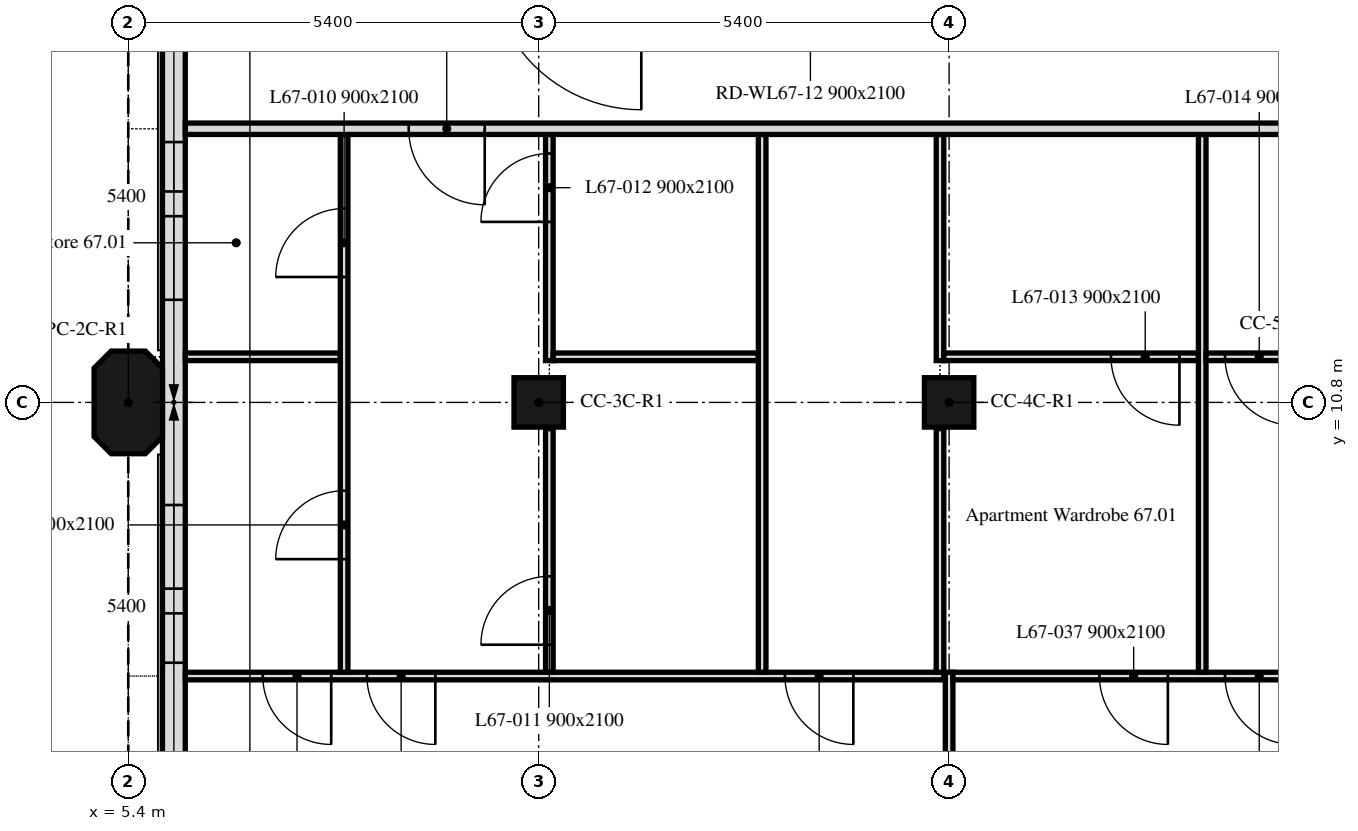
"""IFC4 building model, lengths in metres.
Left out: names, types, materials, properties, quantities, classifications, styles, units other than length and angle.
Written with IfcOpenShell. Run it as: python <this file> out.ifc"""

import sys

from ifc_helpers import new_model, si_unit, direction, frame, frame_2d, origin, origin_2d, place, context, subcontext, project, spatial, polyline, rectangle, outline, extrude, element, fill, save


model = new_model("IFC4")
c1 = context("Model", 3, precision=1e-05, world=origin(), true_north=direction((0.0, 1.0)))
c2 = subcontext(c1, "Body", "Model", "MODEL_VIEW")
j1 = project(units=[si_unit("LENGTHUNIT", "METRE"), si_unit("PLANEANGLEUNIT", "RADIAN")], contexts=[c1])
p1 = place(None, origin())
s1 = spatial("IfcSite", under=j1, at=p1, CompositionType="ELEMENT")
p2 = place(p1, origin())
s2 = spatial("IfcBuilding", under=s1, at=p2, CompositionType="ELEMENT")
p3 = place(p2, frame((0.0, 0.0, 275.2)))
s3 = spatial("IfcBuildingStorey", under=s2, at=p3, CompositionType="ELEMENT", Elevation=275.2)
p4 = place(p3, frame((5.4, 10.8, 0.0), z_axis=(0.0, 0.0, 1.0), x_axis=(0.0, 1.0, 0.0)))
e1 = element("IfcColumn", 1, at=p4, inside=s3, PredefinedType="COLUMN", context=c2, shape_type="SweptSolid", body=[
    extrude(outline(polyline([(-0.45, -0.45), (0.45, -0.45), (0.675, -0.225), (0.675, 0.225), (0.45, 0.45), (-0.45, 0.45), (-0.675, 0.225), (-0.675, -0.225), (-0.45, -0.45)])), origin(), (0.0, 0.0, 1.0), 3.0),
])
for number, where, z_axis, x_axis in (
    (2, (10.8, 10.8, 0.0), (0.0, 0.0, 1.0), (1.0, 0.0, 0.0)),
    (3, (16.2, 10.8, 0.0), (0.0, 0.0, 1.0), (1.0, 0.0, 0.0)),
):
    element("IfcColumn", number, at=place(p3, frame(where, z_axis=z_axis, x_axis=x_axis)), inside=s3, PredefinedType="COLUMN", context=c2, shape_type="SweptSolid", body=[
        extrude(rectangle(XDim=0.65, YDim=0.65, at=origin_2d()), origin(), (0.0, 0.0, 1.0), 3.0),
    ])
p5 = place(p3, frame((6.0, 16.2, 0.0), z_axis=(0.0, 0.0, 1.0), x_axis=(0.0, -1.0, 0.0)))
e4 = element("IfcWall", 4, at=p5, inside=s3, PredefinedType="SOLIDWALL", context=c2, shape_type="SweptSolid", body=[
    extrude(rectangle(XDim=10.614, YDim=0.3, at=frame_2d((5.307, 0.0))), origin(), (0.0, 0.0, 1.0), 3.0),
])
p6 = place(p5, frame((1.975, 0.0, 0.9)))
e5 = element("IfcOpeningElement", 5, at=p6, cuts=e4, PredefinedType="OPENING", context=c2, shape_type="SweptSolid", body=[
    extrude(rectangle(XDim=0.65, YDim=1.7, at=frame_2d((0.325, 0.85))), frame((0.0, 0.16, 0.0), z_axis=(0.0, -1.0, 0.0), x_axis=(1.0, 0.0, 0.0)), (0.0, 0.0, 1.0), 0.32),
])
p7 = place(p5, frame((2.95, 0.0, 0.9)))
e6 = element("IfcOpeningElement", 6, at=p7, cuts=e4, PredefinedType="OPENING", context=c2, shape_type="SweptSolid", body=[
    extrude(rectangle(XDim=1.1, YDim=1.7, at=frame_2d((0.55, 0.85))), frame((0.0, 0.16, 0.0), z_axis=(0.0, -1.0, 0.0), x_axis=(1.0, 0.0, 0.0)), (0.0, 0.0, 1.0), 0.32),
])
p8 = place(p5, frame((6.75, 0.0, 0.9)))
e7 = element("IfcOpeningElement", 7, at=p8, cuts=e4, PredefinedType="OPENING", context=c2, shape_type="SweptSolid", body=[
    extrude(rectangle(XDim=1.1, YDim=1.7, at=frame_2d((0.55, 0.85))), frame((0.0, 0.16, 0.0), z_axis=(0.0, -1.0, 0.0), x_axis=(1.0, 0.0, 0.0)), (0.0, 0.0, 1.0), 0.32),
])
p9 = place(p5, frame((8.175, 0.0, 0.9)))
e8 = element("IfcOpeningElement", 8, at=p9, cuts=e4, PredefinedType="OPENING", context=c2, shape_type="SweptSolid", body=[
    extrude(rectangle(XDim=0.65, YDim=1.7, at=frame_2d((0.325, 0.85))), frame((0.0, 0.16, 0.0), z_axis=(0.0, -1.0, 0.0), x_axis=(1.0, 0.0, 0.0)), (0.0, 0.0, 1.0), 0.32),
])
p10 = place(p3, frame((16.2, 5.745, 0.0), z_axis=(0.0, 0.0, 1.0), x_axis=(0.0, 1.0, 0.0)))
e9 = element("IfcWall", 9, at=p10, inside=s3, PredefinedType="PARTITIONING", context=c2, shape_type="SweptSolid", body=[
    extrude(rectangle(XDim=1.505, YDim=0.1, at=frame_2d((0.752, 0.0))), origin(), (0.0, 0.0, 1.0), 2.4),
])
p11 = place(p3, frame((16.13, 7.2, 0.0), z_axis=(0.0, 0.0, 1.0), x_axis=(-1.0, 0.0, 0.0)))
e10 = element("IfcWall", 10, at=p11, inside=s3, PredefinedType="PARTITIONING", context=c2, shape_type="SweptSolid", body=[
    extrude(rectangle(XDim=9.979, YDim=0.1, at=frame_2d((4.99, 0.0))), origin(), (0.0, 0.0, 1.0), 3.0),
])
p12 = place(p11, frame((1.19, 0.0, 0.0)))
e11 = element("IfcOpeningElement", 11, at=p12, cuts=e10, PredefinedType="OPENING", context=c2, shape_type="SweptSolid", body=[
    extrude(rectangle(XDim=0.9, YDim=2.1, at=frame_2d((0.45, 1.05))), frame((0.0, 0.05, 0.0), z_axis=(0.0, -1.0, 0.0), x_axis=(1.0, 0.0, 0.0)), (0.0, 0.0, 1.0), 0.1),
])
p13 = place(p11, frame((8.06, 0.0, 0.0)))
e12 = element("IfcOpeningElement", 12, at=p13, cuts=e10, PredefinedType="OPENING", context=c2, shape_type="SweptSolid", body=[
    extrude(rectangle(XDim=0.9, YDim=2.1, at=frame_2d((0.45, 1.05))), frame((0.0, 0.05, 0.0), z_axis=(0.0, -1.0, 0.0), x_axis=(1.0, 0.0, 0.0)), (0.0, 0.0, 1.0), 0.1),
])
p14 = place(p11, frame((6.69, 0.0, 0.0)))
e13 = element("IfcOpeningElement", 13, at=p14, cuts=e10, PredefinedType="OPENING", context=c2, shape_type="SweptSolid", body=[
    extrude(rectangle(XDim=0.9, YDim=2.1, at=frame_2d((0.45, 1.05))), frame((0.0, 0.05, 0.0), z_axis=(0.0, -1.0, 0.0), x_axis=(1.0, 0.0, 0.0)), (0.0, 0.0, 1.0), 0.1),
])
p15 = place(p3, frame((21.525, 7.2, 0.0), z_axis=(0.0, 0.0, 1.0), x_axis=(-1.0, 0.0, 0.0)))
e14 = element("IfcWall", 14, at=p15, inside=s3, PredefinedType="PARTITIONING", context=c2, shape_type="SweptSolid", body=[
    extrude(rectangle(XDim=5.275, YDim=0.1, at=frame_2d((2.637, 0.0))), origin(), (0.0, 0.0, 1.0), 3.0),
])
p16 = place(p15, frame((2.447, 0.0, 0.0)))
e15 = element("IfcOpeningElement", 15, at=p16, cuts=e14, PredefinedType="OPENING", context=c2, shape_type="SweptSolid", body=[
    extrude(rectangle(XDim=0.9, YDim=2.1, at=frame_2d((0.45, 1.05))), frame((0.0, 0.05, 0.0), z_axis=(0.0, -1.0, 0.0), x_axis=(1.0, 0.0, 0.0)), (0.0, 0.0, 1.0), 0.1),
])
p17 = place(p15, frame((0.795, 0.0, 0.0)))
e16 = element("IfcOpeningElement", 16, at=p17, cuts=e14, PredefinedType="OPENING", context=c2, shape_type="SweptSolid", body=[
    extrude(rectangle(XDim=0.9, YDim=2.1, at=frame_2d((0.45, 1.05))), frame((0.0, 0.05, 0.0), z_axis=(0.0, -1.0, 0.0), x_axis=(1.0, 0.0, 0.0)), (0.0, 0.0, 1.0), 0.1),
])
p18 = place(p3, frame((8.19, 11.4, 0.0), z_axis=(0.0, 0.0, 1.0), x_axis=(-1.0, 0.0, 0.0)))
e17 = element("IfcWall", 17, at=p18, inside=s3, PredefinedType="PARTITIONING", context=c2, shape_type="SweptSolid", body=[
    extrude(rectangle(XDim=2.039, YDim=0.1, at=frame_2d((1.02, 0.0))), origin(), (0.0, 0.0, 1.0), 3.0),
])
p19 = place(p3, frame((8.24, 7.25, 0.0), z_axis=(0.0, 0.0, 1.0), x_axis=(0.0, 1.0, 0.0)))
e18 = element("IfcWall", 18, at=p19, inside=s3, PredefinedType="PARTITIONING", context=c2, shape_type="SweptSolid", body=[
    extrude(rectangle(XDim=7.075, YDim=0.1, at=frame_2d((3.538, 0.0))), origin(), (0.0, 0.0, 1.0), 3.0),
])
p20 = place(p19, frame((5.2, 0.0, 0.0)))
e19 = element("IfcOpeningElement", 19, at=p20, cuts=e18, PredefinedType="OPENING", context=c2, shape_type="SweptSolid", body=[
    extrude(rectangle(XDim=0.9, YDim=2.1, at=frame_2d((0.45, 1.05))), frame((0.0, 0.05, 0.0), z_axis=(0.0, -1.0, 0.0), x_axis=(1.0, 0.0, 0.0)), (0.0, 0.0, 1.0), 0.1),
])
p21 = place(p19, frame((1.488, 0.0, 0.0)))
e20 = element("IfcOpeningElement", 20, at=p21, cuts=e18, PredefinedType="OPENING", context=c2, shape_type="SweptSolid", body=[
    extrude(rectangle(XDim=0.9, YDim=2.1, at=frame_2d((0.45, 1.05))), frame((0.0, 0.05, 0.0), z_axis=(0.0, -1.0, 0.0), x_axis=(1.0, 0.0, 0.0)), (0.0, 0.0, 1.0), 0.1),
])
p22 = place(p3, frame((10.94, 7.25, 0.0), z_axis=(0.0, 0.0, 1.0), x_axis=(0.0, 1.0, 0.0)))
e21 = element("IfcWall", 21, at=p22, inside=s3, PredefinedType="PARTITIONING", context=c2, shape_type="SweptSolid", body=[
    extrude(rectangle(XDim=3.205, YDim=0.1, at=frame_2d((1.603, 0.0))), origin(), (0.0, 0.0, 1.0), 3.0),
])
p23 = place(p22, frame((0.362, 0.0, 0.0)))
e22 = element("IfcOpeningElement", 22, at=p23, cuts=e21, PredefinedType="OPENING", context=c2, shape_type="SweptSolid", body=[
    extrude(rectangle(XDim=0.9, YDim=2.1, at=frame_2d((0.45, 1.05))), frame((0.0, 0.05, 0.0), z_axis=(0.0, -1.0, 0.0), x_axis=(1.0, 0.0, 0.0)), (0.0, 0.0, 1.0), 0.1),
])
p24 = place(p3, frame((10.94, 11.35, 0.0), z_axis=(0.0, 0.0, 1.0), x_axis=(0.0, 1.0, 0.0)))
e23 = element("IfcWall", 23, at=p24, inside=s3, PredefinedType="PARTITIONING", context=c2, shape_type="SweptSolid", body=[
    extrude(rectangle(XDim=2.975, YDim=0.1, at=frame_2d((1.487, 0.0))), origin(), (0.0, 0.0, 1.0), 3.0),
])
p25 = place(p24, frame((1.825, 0.0, 0.0)))
e24 = element("IfcOpeningElement", 24, at=p25, cuts=e23, PredefinedType="OPENING", context=c2, shape_type="SweptSolid", body=[
    extrude(rectangle(XDim=0.9, YDim=2.1, at=frame_2d((0.45, 1.05))), frame((0.0, 0.05, 0.0), z_axis=(0.0, -1.0, 0.0), x_axis=(1.0, 0.0, 0.0)), (0.0, 0.0, 1.0), 0.1),
])
p26 = place(p3, frame((13.69, 11.4, 0.0), z_axis=(0.0, 0.0, 1.0), x_axis=(-1.0, 0.0, 0.0)))
e25 = element("IfcWall", 25, at=p26, inside=s3, PredefinedType="PARTITIONING", context=c2, shape_type="SweptSolid", body=[
    extrude(rectangle(XDim=2.7, YDim=0.1, at=frame_2d((1.35, 0.0))), origin(), (0.0, 0.0, 1.0), 3.0),
])
p27 = place(p3, frame((13.74, 7.25, 0.0), z_axis=(0.0, 0.0, 1.0), x_axis=(0.0, 1.0, 0.0)))
e26 = element("IfcWall", 26, at=p27, inside=s3, PredefinedType="PARTITIONING", context=c2, shape_type="SweptSolid", body=[
    extrude(rectangle(XDim=7.075, YDim=0.1, at=frame_2d((3.538, 0.0))), origin(), (0.0, 0.0, 1.0), 3.0),
])
p28 = place(p3, frame((16.08, 7.25, 0.0), z_axis=(0.0, 0.0, 1.0), x_axis=(0.0, 1.0, 0.0)))
e27 = element("IfcWall", 27, at=p28, inside=s3, PredefinedType="PARTITIONING", context=c2, shape_type="SweptSolid", body=[
    extrude(rectangle(XDim=3.205, YDim=0.1, at=frame_2d((1.603, 0.0))), origin(), (0.0, 0.0, 1.0), 2.4),
])
p29 = place(p3, frame((16.08, 11.35, 0.0), z_axis=(0.0, 0.0, 1.0), x_axis=(0.0, 1.0, 0.0)))
e28 = element("IfcWall", 28, at=p29, inside=s3, PredefinedType="PARTITIONING", context=c2, shape_type="SweptSolid", body=[
    extrude(rectangle(XDim=2.975, YDim=0.1, at=frame_2d((1.487, 0.0))), origin(), (0.0, 0.0, 1.0), 2.4),
])
p30 = place(p3, frame((19.48, 11.4, 0.0), z_axis=(0.0, 0.0, 1.0), x_axis=(-1.0, 0.0, 0.0)))
e29 = element("IfcWall", 29, at=p30, inside=s3, PredefinedType="PARTITIONING", context=c2, shape_type="SweptSolid", body=[
    extrude(rectangle(XDim=3.35, YDim=0.1, at=frame_2d((1.675, 0.0))), origin(), (0.0, 0.0, 1.0), 3.0),
])
p31 = place(p30, frame((0.25, 0.0, 0.0)))
e30 = element("IfcOpeningElement", 30, at=p31, cuts=e29, PredefinedType="OPENING", context=c2, shape_type="SweptSolid", body=[
    extrude(rectangle(XDim=0.9, YDim=2.1, at=frame_2d((0.45, 1.05))), frame((0.0, 0.05, 0.0), z_axis=(0.0, -1.0, 0.0), x_axis=(1.0, 0.0, 0.0)), (0.0, 0.0, 1.0), 0.1),
])
p32 = place(p3, frame((19.53, 7.25, 0.0), z_axis=(0.0, 0.0, 1.0), x_axis=(0.0, 1.0, 0.0)))
e31 = element("IfcWall", 31, at=p32, inside=s3, PredefinedType="PARTITIONING", context=c2, shape_type="SweptSolid", body=[
    extrude(rectangle(XDim=7.075, YDim=0.1, at=frame_2d((3.538, 0.0))), origin(), (0.0, 0.0, 1.0), 3.0),
])
p33 = place(p3, frame((23.221, 11.4, 0.0), z_axis=(0.0, 0.0, 1.0), x_axis=(-1.0, 0.0, 0.0)))
e32 = element("IfcWall", 32, at=p33, inside=s3, PredefinedType="PARTITIONING", context=c2, shape_type="SweptSolid", body=[
    extrude(rectangle(XDim=3.641, YDim=0.1, at=frame_2d((1.82, 0.0))), origin(), (0.0, 0.0, 1.0), 2.4),
])
p34 = place(p33, frame((2.491, 0.0, 0.0)))
e33 = element("IfcOpeningElement", 33, at=p34, cuts=e32, PredefinedType="OPENING", context=c2, shape_type="SweptSolid", body=[
    extrude(rectangle(XDim=0.9, YDim=2.1, at=frame_2d((0.45, 1.05))), frame((0.0, 0.05, 0.0), z_axis=(0.0, -1.0, 0.0), x_axis=(1.0, 0.0, 0.0)), (0.0, 0.0, 1.0), 0.1),
])
p35 = place(p3, frame((47.849, 14.4, 0.0), z_axis=(0.0, 0.0, 1.0), x_axis=(-1.0, 0.0, 0.0)))
e34 = element("IfcWall", 34, at=p35, inside=s3, PredefinedType="PARTITIONING", context=c2, shape_type="SweptSolid", body=[
    extrude(rectangle(XDim=41.698, YDim=0.15, at=frame_2d((20.849, 0.0))), origin(), (0.0, 0.0, 1.0), 2.4),
])
p36 = place(p35, frame((10.881, 0.0, 0.0)))
e35 = element("IfcOpeningElement", 35, at=p36, cuts=e34, PredefinedType="OPENING", context=c2, shape_type="SweptSolid", body=[
    extrude(rectangle(XDim=1.0, YDim=2.1, at=frame_2d((0.5, 1.05))), frame((0.0, 0.075, 0.0), z_axis=(0.0, -1.0, 0.0), x_axis=(1.0, 0.0, 0.0)), (0.0, 0.0, 1.0), 0.15),
])
p37 = place(p35, frame((37.759, 0.0, 0.0)))
e36 = element("IfcOpeningElement", 36, at=p37, cuts=e34, PredefinedType="OPENING", context=c2, shape_type="SweptSolid", body=[
    extrude(rectangle(XDim=1.0, YDim=2.1, at=frame_2d((0.5, 1.05))), frame((0.0, 0.075, 0.0), z_axis=(0.0, -1.0, 0.0), x_axis=(1.0, 0.0, 0.0)), (0.0, 0.0, 1.0), 0.15),
])
p38 = place(p35, frame((22.815, 0.0, 0.0)))
e37 = element("IfcOpeningElement", 37, at=p38, cuts=e34, PredefinedType="OPENING", context=c2, shape_type="SweptSolid", body=[
    extrude(rectangle(XDim=1.0, YDim=2.1, at=frame_2d((0.5, 1.05))), frame((0.0, 0.075, 0.0), z_axis=(0.0, -1.0, 0.0), x_axis=(1.0, 0.0, 0.0)), (0.0, 0.0, 1.0), 0.15),
])
p39 = place(p35, frame((4.85, 0.0, 0.0)))
e38 = element("IfcOpeningElement", 38, at=p39, cuts=e34, PredefinedType="OPENING", context=c2, shape_type="SweptSolid", body=[
    extrude(rectangle(XDim=1.0, YDim=2.1, at=frame_2d((0.5, 1.05))), frame((0.0, 0.075, 0.0), z_axis=(0.0, -1.0, 0.0), x_axis=(1.0, 0.0, 0.0)), (0.0, 0.0, 1.0), 0.15),
])
p40 = place(p6, origin())
e39 = element("IfcWindow", 39, at=p40, inside=s3, PartitioningType="SINGLE_PANEL", PredefinedType="WINDOW", context=c2, shape_type="SweptSolid", body=[
    extrude(rectangle(XDim=0.65, YDim=1.7, at=frame_2d((0.325, 0.85))), frame((0.0, 0.03, 0.0), z_axis=(0.0, -1.0, 0.0), x_axis=(1.0, 0.0, 0.0)), (0.0, 0.0, 1.0), 0.06),
])
fill(e5, e39)
p41 = place(p7, origin())
e40 = element("IfcWindow", 40, at=p41, inside=s3, PartitioningType="SINGLE_PANEL", PredefinedType="WINDOW", context=c2, shape_type="SweptSolid", body=[
    extrude(rectangle(XDim=1.1, YDim=1.7, at=frame_2d((0.55, 0.85))), frame((0.0, 0.03, 0.0), z_axis=(0.0, -1.0, 0.0), x_axis=(1.0, 0.0, 0.0)), (0.0, 0.0, 1.0), 0.06),
])
fill(e6, e40)
p42 = place(p8, origin())
e41 = element("IfcWindow", 41, at=p42, inside=s3, PartitioningType="SINGLE_PANEL", PredefinedType="WINDOW", context=c2, shape_type="SweptSolid", body=[
    extrude(rectangle(XDim=1.1, YDim=1.7, at=frame_2d((0.55, 0.85))), frame((0.0, 0.03, 0.0), z_axis=(0.0, -1.0, 0.0), x_axis=(1.0, 0.0, 0.0)), (0.0, 0.0, 1.0), 0.06),
])
fill(e7, e41)
p43 = place(p9, origin())
e42 = element("IfcWindow", 42, at=p43, inside=s3, PartitioningType="SINGLE_PANEL", PredefinedType="WINDOW", context=c2, shape_type="SweptSolid", body=[
    extrude(rectangle(XDim=0.65, YDim=1.7, at=frame_2d((0.325, 0.85))), frame((0.0, 0.03, 0.0), z_axis=(0.0, -1.0, 0.0), x_axis=(1.0, 0.0, 0.0)), (0.0, 0.0, 1.0), 0.06),
])
fill(e8, e42)
p44 = place(p12, origin())
e43 = element("IfcDoor", 43, at=p44, inside=s3, OperationType="SINGLE_SWING_RIGHT", PredefinedType="DOOR", context=c2, shape_type="SweptSolid", body=[
    extrude(rectangle(XDim=0.9, YDim=2.1, at=frame_2d((0.45, 1.05))), frame((0.0, 0.025, 0.0), z_axis=(0.0, -1.0, 0.0), x_axis=(1.0, 0.0, 0.0)), (0.0, 0.0, 1.0), 0.05),
])
fill(e11, e43)
p45 = place(p20, origin())
e44 = element("IfcDoor", 44, at=p45, inside=s3, OperationType="SINGLE_SWING_RIGHT", PredefinedType="DOOR", context=c2, shape_type="SweptSolid", body=[
    extrude(rectangle(XDim=0.9, YDim=2.1, at=frame_2d((0.45, 1.05))), frame((0.0, 0.025, 0.0), z_axis=(0.0, -1.0, 0.0), x_axis=(1.0, 0.0, 0.0)), (0.0, 0.0, 1.0), 0.05),
])
fill(e19, e44)
p46 = place(p23, origin())
e45 = element("IfcDoor", 45, at=p46, inside=s3, OperationType="SINGLE_SWING_LEFT", PredefinedType="DOOR", context=c2, shape_type="SweptSolid", body=[
    extrude(rectangle(XDim=0.9, YDim=2.1, at=frame_2d((0.45, 1.05))), frame((0.0, 0.025, 0.0), z_axis=(0.0, -1.0, 0.0), x_axis=(1.0, 0.0, 0.0)), (0.0, 0.0, 1.0), 0.05),
])
fill(e22, e45)
p47 = place(p25, origin())
e46 = element("IfcDoor", 46, at=p47, inside=s3, OperationType="SINGLE_SWING_LEFT", PredefinedType="DOOR", context=c2, shape_type="SweptSolid", body=[
    extrude(rectangle(XDim=0.9, YDim=2.1, at=frame_2d((0.45, 1.05))), frame((0.0, 0.025, 0.0), z_axis=(0.0, -1.0, 0.0), x_axis=(1.0, 0.0, 0.0)), (0.0, 0.0, 1.0), 0.05),
])
fill(e24, e46)
p48 = place(p31, origin())
e47 = element("IfcDoor", 47, at=p48, inside=s3, OperationType="SINGLE_SWING_RIGHT", PredefinedType="DOOR", context=c2, shape_type="SweptSolid", body=[
    extrude(rectangle(XDim=0.9, YDim=2.1, at=frame_2d((0.45, 1.05))), frame((0.0, 0.025, 0.0), z_axis=(0.0, -1.0, 0.0), x_axis=(1.0, 0.0, 0.0)), (0.0, 0.0, 1.0), 0.05),
])
fill(e30, e47)
p49 = place(p34, origin())
e48 = element("IfcDoor", 48, at=p49, inside=s3, OperationType="SINGLE_SWING_RIGHT", PredefinedType="DOOR", context=c2, shape_type="SweptSolid", body=[
    extrude(rectangle(XDim=0.9, YDim=2.1, at=frame_2d((0.45, 1.05))), frame((0.0, 0.025, 0.0), z_axis=(0.0, -1.0, 0.0), x_axis=(1.0, 0.0, 0.0)), (0.0, 0.0, 1.0), 0.05),
])
fill(e33, e48)
p50 = place(p13, origin())
e49 = element("IfcDoor", 49, at=p50, inside=s3, OperationType="SINGLE_SWING_LEFT", PredefinedType="DOOR", context=c2, shape_type="SweptSolid", body=[
    extrude(rectangle(XDim=0.9, YDim=2.1, at=frame_2d((0.45, 1.05))), frame((0.0, 0.025, 0.0), z_axis=(0.0, -1.0, 0.0), x_axis=(1.0, 0.0, 0.0)), (0.0, 0.0, 1.0), 0.05),
])
fill(e12, e49)
p51 = place(p16, origin())
e50 = element("IfcDoor", 50, at=p51, inside=s3, OperationType="SINGLE_SWING_LEFT", PredefinedType="DOOR", context=c2, shape_type="SweptSolid", body=[
    extrude(rectangle(XDim=0.9, YDim=2.1, at=frame_2d((0.45, 1.05))), frame((0.0, 0.025, 0.0), z_axis=(0.0, -1.0, 0.0), x_axis=(1.0, 0.0, 0.0)), (0.0, 0.0, 1.0), 0.05),
])
fill(e15, e50)
p52 = place(p17, origin())
e51 = element("IfcDoor", 51, at=p52, inside=s3, OperationType="SINGLE_SWING_RIGHT", PredefinedType="DOOR", context=c2, shape_type="SweptSolid", body=[
    extrude(rectangle(XDim=0.9, YDim=2.1, at=frame_2d((0.45, 1.05))), frame((0.0, 0.025, 0.0), z_axis=(0.0, -1.0, 0.0), x_axis=(1.0, 0.0, 0.0)), (0.0, 0.0, 1.0), 0.05),
])
fill(e16, e51)
p53 = place(p21, origin())
e52 = element("IfcDoor", 52, at=p53, inside=s3, OperationType="SINGLE_SWING_LEFT", PredefinedType="DOOR", context=c2, shape_type="SweptSolid", body=[
    extrude(rectangle(XDim=0.9, YDim=2.1, at=frame_2d((0.45, 1.05))), frame((0.0, 0.025, 0.0), z_axis=(0.0, -1.0, 0.0), x_axis=(1.0, 0.0, 0.0)), (0.0, 0.0, 1.0), 0.05),
])
fill(e20, e52)
p54 = place(p14, origin())
e53 = element("IfcDoor", 53, at=p54, inside=s3, OperationType="SINGLE_SWING_RIGHT", PredefinedType="DOOR", context=c2, shape_type="SweptSolid", body=[
    extrude(rectangle(XDim=0.9, YDim=2.1, at=frame_2d((0.45, 1.05))), frame((0.0, 0.025, 0.0), z_axis=(0.0, -1.0, 0.0), x_axis=(1.0, 0.0, 0.0)), (0.0, 0.0, 1.0), 0.05),
])
fill(e13, e53)
p55 = place(p37, origin())
e54 = element("IfcDoor", 54, at=p55, inside=s3, OperationType="SINGLE_SWING_LEFT", PredefinedType="DOOR", context=c2, shape_type="SweptSolid", body=[
    extrude(rectangle(XDim=1.0, YDim=2.1, at=frame_2d((0.5, 1.05))), frame((0.0, 0.025, 0.0), z_axis=(0.0, -1.0, 0.0), x_axis=(1.0, 0.0, 0.0)), (0.0, 0.0, 1.0), 0.05),
])
fill(e36, e54)
save(model, sys.argv[1])
